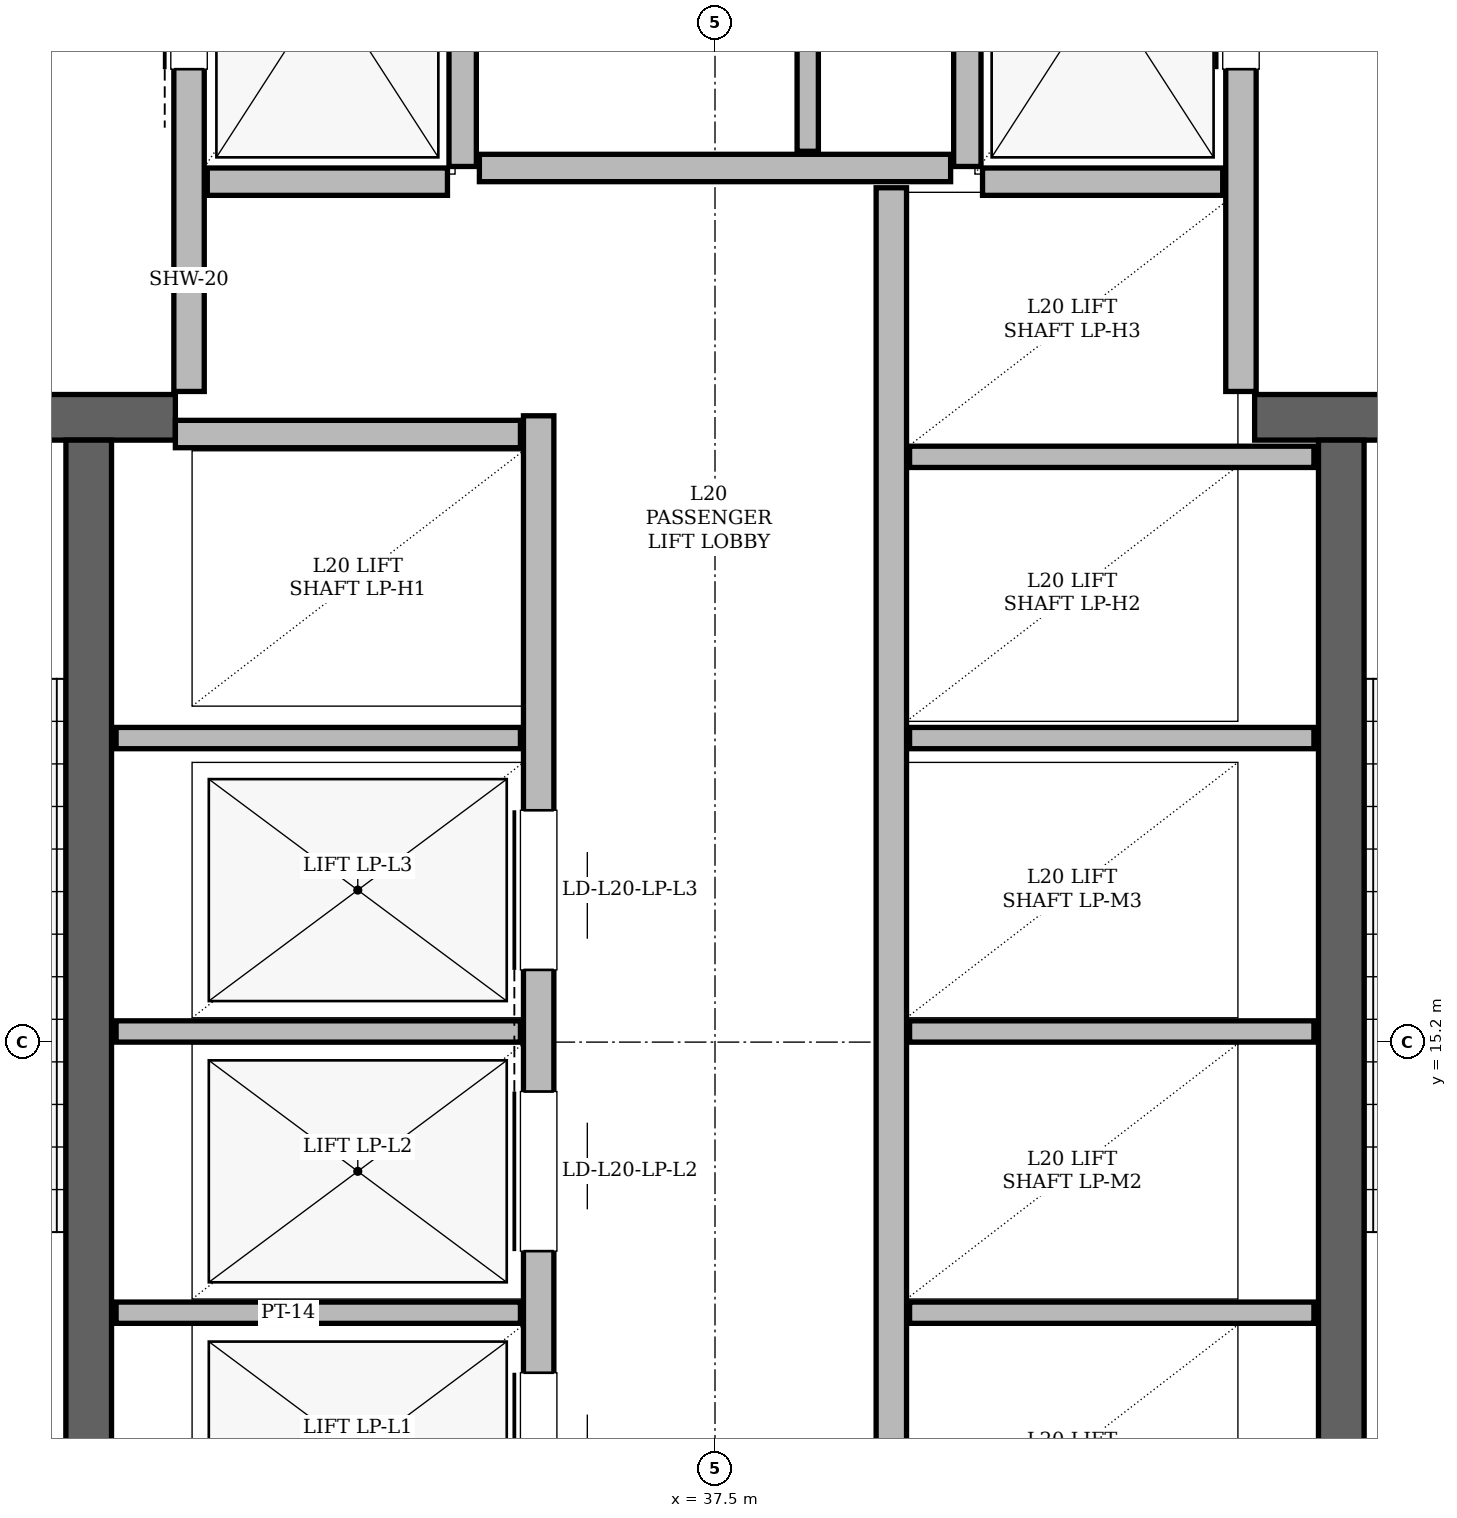
"""IFC4 building model, lengths in metres.
Left out: names, types, materials, properties, quantities, classifications, styles, units other than length and angle.
Written with IfcOpenShell. Run it as: python <this file> out.ifc"""

import sys

from ifc_helpers import new_model, si_unit, direction, frame, frame_2d, origin, place, context, subcontext, project, spatial, rectangle, extrude, element, fill, save


model = new_model("IFC4")
c1 = context("Model", 3, precision=1e-05, world=origin(), true_north=direction((0.0, 1.0)))
c2 = subcontext(c1, "Body", "Model", "MODEL_VIEW")
j1 = project(units=[si_unit("LENGTHUNIT", "METRE"), si_unit("PLANEANGLEUNIT", "RADIAN")], contexts=[c1])
p1 = place(None, origin())
s1 = spatial("IfcSite", under=j1, at=p1, CompositionType="ELEMENT")
p2 = place(p1, origin())
s2 = spatial("IfcBuilding", under=s1, at=p2, CompositionType="ELEMENT")
p3 = place(p2, frame((0.0, 0.0, 77.7)))
s3 = spatial("IfcBuildingStorey", under=s2, at=p3, CompositionType="ELEMENT", Elevation=77.7)
p4 = place(p3, frame((29.94, 19.31, 0.0), z_axis=(0.0, 0.0, 1.0), x_axis=(1.0, 0.0, 0.0)))
e1 = element("IfcWall", 1, at=p4, inside=s3, PredefinedType="SHEAR", context=c2, shape_type="SweptSolid", body=[
    extrude(rectangle(XDim=4.01, YDim=0.3, at=frame_2d((2.005, 0.0))), origin(), (0.0, 0.0, 1.0), 4.56),
])
p5 = place(p4, frame((1.01, 0.0, 0.0)))
e2 = element("IfcOpeningElement", 2, at=p5, cuts=e1, PredefinedType="OPENING", context=c2, shape_type="SweptSolid", body=[
    extrude(rectangle(XDim=1.4, YDim=2.2, at=frame_2d((0.7, 1.1))), frame((0.0, 0.15, 0.0), z_axis=(0.0, -1.0, 0.0), x_axis=(1.0, 0.0, 0.0)), (0.0, 0.0, 1.0), 0.3),
])
p6 = place(p3, frame((41.05, 19.31, 0.0), z_axis=(0.0, 0.0, 1.0), x_axis=(1.0, 0.0, 0.0)))
e3 = element("IfcWall", 3, at=p6, inside=s3, PredefinedType="SHEAR", context=c2, shape_type="SweptSolid", body=[
    extrude(rectangle(XDim=4.01, YDim=0.3, at=frame_2d((2.005, 0.0))), origin(), (0.0, 0.0, 1.0), 4.56),
])
p7 = place(p6, frame((1.6, 0.0, 0.0)))
e4 = element("IfcOpeningElement", 4, at=p7, cuts=e3, PredefinedType="OPENING", context=c2, shape_type="SweptSolid", body=[
    extrude(rectangle(XDim=1.4, YDim=2.2, at=frame_2d((0.7, 1.1))), frame((0.0, 0.15, 0.0), z_axis=(0.0, -1.0, 0.0), x_axis=(1.0, 0.0, 0.0)), (0.0, 0.0, 1.0), 0.3),
])
for number, where, z_axis, x_axis in (
    (5, (33.38, 11.54, 0.0), (0.0, 0.0, 1.0), (0.0, 1.0, 0.0)),
    (6, (41.62, 11.54, 0.0), (0.0, 0.0, 1.0), (0.0, 1.0, 0.0)),
):
    element("IfcWall", number, at=place(p3, frame(where, z_axis=z_axis, x_axis=x_axis)), inside=s3, PredefinedType="SHEAR", context=c2, shape_type="SweptSolid", body=[
        extrude(rectangle(XDim=7.62, YDim=0.3, at=frame_2d((3.81, 0.0))), origin(), (0.0, 0.0, 1.0), 4.56),
    ])
p8 = place(p3, frame((34.04, 19.48, 0.0), z_axis=(0.0, 0.0, 1.0), x_axis=(0.0, 1.0, 0.0)))
e7 = element("IfcWall", 7, at=p8, inside=s3, PredefinedType="PARTITIONING", context=c2, shape_type="SweptSolid", body=[
    extrude(rectangle(XDim=4.5, YDim=0.2, at=frame_2d((2.25, 0.0))), origin(), (0.0, 0.0, 1.0), 3.6),
])
p9 = place(p8, frame((2.12, 0.0, 0.0)))
e8 = element("IfcOpeningElement", 8, at=p9, cuts=e7, PredefinedType="OPENING", context=c2, shape_type="SweptSolid", body=[
    extrude(rectangle(XDim=1.1, YDim=2.2, at=frame_2d((0.55, 1.1))), frame((0.0, 0.1, 0.0), z_axis=(0.0, -1.0, 0.0), x_axis=(1.0, 0.0, 0.0)), (0.0, 0.0, 1.0), 0.2),
])
p10 = place(p3, frame((35.84, 20.96, 0.0), z_axis=(0.0, 0.0, 1.0), x_axis=(0.0, 1.0, 0.0)))
e9 = element("IfcWall", 9, at=p10, inside=s3, PredefinedType="PARTITIONING", context=c2, shape_type="SweptSolid", body=[
    extrude(rectangle(XDim=3.02, YDim=0.18, at=frame_2d((1.51, 0.0))), origin(), (0.0, 0.0, 1.0), 3.6),
])
p11 = place(p3, frame((34.16, 20.86, 0.0), z_axis=(0.0, 0.0, 1.0), x_axis=(1.0, 0.0, 0.0)))
e10 = element("IfcWall", 10, at=p11, inside=s3, PredefinedType="PARTITIONING", context=c2, shape_type="SweptSolid", body=[
    extrude(rectangle(XDim=1.58, YDim=0.18, at=frame_2d((0.79, 0.0))), origin(), (0.0, 0.0, 1.0), 4.56),
])
p12 = place(p3, frame((40.96, 19.48, 0.0), z_axis=(0.0, 0.0, 1.0), x_axis=(0.0, 1.0, 0.0)))
e11 = element("IfcWall", 11, at=p12, inside=s3, PredefinedType="PARTITIONING", context=c2, shape_type="SweptSolid", body=[
    extrude(rectangle(XDim=4.5, YDim=0.2, at=frame_2d((2.25, 0.0))), origin(), (0.0, 0.0, 1.0), 3.6),
])
p13 = place(p12, frame((2.12, 0.0, 0.0)))
e12 = element("IfcOpeningElement", 12, at=p13, cuts=e11, PredefinedType="OPENING", context=c2, shape_type="SweptSolid", body=[
    extrude(rectangle(XDim=1.1, YDim=2.2, at=frame_2d((0.55, 1.1))), frame((0.0, 0.1, 0.0), z_axis=(0.0, -1.0, 0.0), x_axis=(1.0, 0.0, 0.0)), (0.0, 0.0, 1.0), 0.2),
])
p14 = place(p3, frame((39.16, 20.96, 0.0), z_axis=(0.0, 0.0, 1.0), x_axis=(0.0, 1.0, 0.0)))
e13 = element("IfcWall", 13, at=p14, inside=s3, PredefinedType="PARTITIONING", context=c2, shape_type="SweptSolid", body=[
    extrude(rectangle(XDim=3.02, YDim=0.18, at=frame_2d((1.51, 0.0))), origin(), (0.0, 0.0, 1.0), 3.6),
])
p15 = place(p3, frame((39.26, 20.86, 0.0), z_axis=(0.0, 0.0, 1.0), x_axis=(1.0, 0.0, 0.0)))
e14 = element("IfcWall", 14, at=p15, inside=s3, PredefinedType="PARTITIONING", context=c2, shape_type="SweptSolid", body=[
    extrude(rectangle(XDim=1.58, YDim=0.18, at=frame_2d((0.79, 0.0))), origin(), (0.0, 0.0, 1.0), 4.56),
])
p16 = place(p3, frame((36.34, 11.72, 0.0), z_axis=(0.0, 0.0, 1.0), x_axis=(0.0, 1.0, 0.0)))
e15 = element("IfcWall", 15, at=p16, inside=s3, PredefinedType="PARTITIONING", context=c2, shape_type="SweptSolid", body=[
    extrude(rectangle(XDim=7.6, YDim=0.2, at=frame_2d((3.8, 0.0))), origin(), (0.0, 0.0, 1.0), 4.56),
])
p17 = place(p16, frame((0.255, 0.0, 0.0)))
e16 = element("IfcOpeningElement", 16, at=p17, cuts=e15, PredefinedType="OPENING", context=c2, shape_type="SweptSolid", body=[
    extrude(rectangle(XDim=1.05, YDim=2.15, at=frame_2d((0.525, 1.075))), frame((0.0, 0.1, 0.0), z_axis=(0.0, -1.0, 0.0), x_axis=(1.0, 0.0, 0.0)), (0.0, 0.0, 1.0), 0.2),
])
p18 = place(p16, frame((2.105, 0.0, 0.0)))
e17 = element("IfcOpeningElement", 17, at=p18, cuts=e15, PredefinedType="OPENING", context=c2, shape_type="SweptSolid", body=[
    extrude(rectangle(XDim=1.05, YDim=2.15, at=frame_2d((0.525, 1.075))), frame((0.0, 0.1, 0.0), z_axis=(0.0, -1.0, 0.0), x_axis=(1.0, 0.0, 0.0)), (0.0, 0.0, 1.0), 0.2),
])
p19 = place(p16, frame((3.955, 0.0, 0.0)))
e18 = element("IfcOpeningElement", 18, at=p19, cuts=e15, PredefinedType="OPENING", context=c2, shape_type="SweptSolid", body=[
    extrude(rectangle(XDim=1.05, YDim=2.15, at=frame_2d((0.525, 1.075))), frame((0.0, 0.1, 0.0), z_axis=(0.0, -1.0, 0.0), x_axis=(1.0, 0.0, 0.0)), (0.0, 0.0, 1.0), 0.2),
])
p20 = place(p3, frame((33.95, 19.2, 0.0), z_axis=(0.0, 0.0, 1.0), x_axis=(1.0, 0.0, 0.0)))
e19 = element("IfcWall", 19, at=p20, inside=s3, PredefinedType="PARTITIONING", context=c2, shape_type="SweptSolid", body=[
    extrude(rectangle(XDim=2.27, YDim=0.18, at=frame_2d((1.135, 0.0))), origin(), (0.0, 0.0, 1.0), 4.56),
])
for number, where, z_axis, x_axis in (
    (20, (33.56, 13.42, 0.0), (0.0, 0.0, 1.0), (1.0, 0.0, 0.0)),
    (21, (33.56, 15.27, 0.0), (0.0, 0.0, 1.0), (1.0, 0.0, 0.0)),
    (22, (33.56, 17.2, 0.0), (0.0, 0.0, 1.0), (1.0, 0.0, 0.0)),
):
    element("IfcWall", number, at=place(p3, frame(where, z_axis=z_axis, x_axis=x_axis)), inside=s3, PredefinedType="PARTITIONING", context=c2, shape_type="SweptSolid", body=[
        extrude(rectangle(XDim=2.66, YDim=0.14, at=frame_2d((1.33, 0.0))), origin(), (0.0, 0.0, 1.0), 4.56),
    ])
p21 = place(p3, frame((38.66, 11.72, 0.0), z_axis=(0.0, 0.0, 1.0), x_axis=(0.0, 1.0, 0.0)))
e23 = element("IfcWall", 23, at=p21, inside=s3, PredefinedType="PARTITIONING", context=c2, shape_type="SweptSolid", body=[
    extrude(rectangle(XDim=9.1, YDim=0.2, at=frame_2d((4.55, 0.0))), origin(), (0.0, 0.0, 1.0), 4.56),
])
for number, where, z_axis, x_axis in (
    (24, (38.78, 13.42, 0.0), (0.0, 0.0, 1.0), (1.0, 0.0, 0.0)),
    (25, (38.78, 15.27, 0.0), (0.0, 0.0, 1.0), (1.0, 0.0, 0.0)),
    (26, (38.78, 17.2, 0.0), (0.0, 0.0, 1.0), (1.0, 0.0, 0.0)),
    (27, (38.78, 19.05, 0.0), (0.0, 0.0, 1.0), (1.0, 0.0, 0.0)),
):
    element("IfcWall", number, at=place(p3, frame(where, z_axis=z_axis, x_axis=x_axis)), inside=s3, PredefinedType="PARTITIONING", context=c2, shape_type="SweptSolid", body=[
        extrude(rectangle(XDim=2.66, YDim=0.14, at=frame_2d((1.33, 0.0))), origin(), (0.0, 0.0, 1.0), 4.56),
    ])
p22 = place(p3, frame((35.95, 20.95, 0.0), z_axis=(0.0, 0.0, 1.0), x_axis=(1.0, 0.0, 0.0)))
e28 = element("IfcWall", 28, at=p22, inside=s3, PredefinedType="PARTITIONING", context=c2, shape_type="SweptSolid", body=[
    extrude(rectangle(XDim=3.1, YDim=0.18, at=frame_2d((1.55, 0.0))), origin(), (0.0, 0.0, 1.0), 4.56),
])
p23 = place(p3, frame((38.11, 21.06, 0.0), z_axis=(0.0, 0.0, 1.0), x_axis=(0.0, 1.0, 0.0)))
e29 = element("IfcWall", 29, at=p23, inside=s3, PredefinedType="PARTITIONING", context=c2, shape_type="SweptSolid", body=[
    extrude(rectangle(XDim=2.92, YDim=0.14, at=frame_2d((1.46, 0.0))), origin(), (0.0, 0.0, 1.0), 3.6),
])
p24 = place(p9, origin())
e30 = element("IfcDoor", 30, at=p24, inside=s3, OperationType="SLIDING_TO_LEFT", PredefinedType="DOOR", context=c2, shape_type="SweptSolid", body=[
    extrude(rectangle(XDim=1.1, YDim=2.2, at=frame_2d((0.55, 1.1))), frame((0.0, 0.025, 0.0), z_axis=(0.0, -1.0, 0.0), x_axis=(1.0, 0.0, 0.0)), (0.0, 0.0, 1.0), 0.05),
])
fill(e8, e30)
p25 = place(p13, origin())
e31 = element("IfcDoor", 31, at=p25, inside=s3, OperationType="SLIDING_TO_RIGHT", PredefinedType="DOOR", context=c2, shape_type="SweptSolid", body=[
    extrude(rectangle(XDim=1.1, YDim=2.2, at=frame_2d((0.55, 1.1))), frame((0.0, 0.025, 0.0), z_axis=(0.0, -1.0, 0.0), x_axis=(1.0, 0.0, 0.0)), (0.0, 0.0, 1.0), 0.05),
])
fill(e12, e31)
p26 = place(p17, origin())
e32 = element("IfcDoor", 32, at=p26, inside=s3, OperationType="SLIDING_TO_LEFT", PredefinedType="DOOR", context=c2, shape_type="SweptSolid", body=[
    extrude(rectangle(XDim=1.05, YDim=2.15, at=frame_2d((0.525, 1.075))), frame((0.0, 0.025, 0.0), z_axis=(0.0, -1.0, 0.0), x_axis=(1.0, 0.0, 0.0)), (0.0, 0.0, 1.0), 0.05),
])
fill(e16, e32)
p27 = place(p18, origin())
e33 = element("IfcDoor", 33, at=p27, inside=s3, OperationType="SLIDING_TO_RIGHT", PredefinedType="DOOR", context=c2, shape_type="SweptSolid", body=[
    extrude(rectangle(XDim=1.05, YDim=2.15, at=frame_2d((0.525, 1.075))), frame((0.0, 0.025, 0.0), z_axis=(0.0, -1.0, 0.0), x_axis=(1.0, 0.0, 0.0)), (0.0, 0.0, 1.0), 0.05),
])
fill(e17, e33)
p28 = place(p19, origin())
e34 = element("IfcDoor", 34, at=p28, inside=s3, OperationType="SLIDING_TO_LEFT", PredefinedType="DOOR", context=c2, shape_type="SweptSolid", body=[
    extrude(rectangle(XDim=1.05, YDim=2.15, at=frame_2d((0.525, 1.075))), frame((0.0, 0.025, 0.0), z_axis=(0.0, -1.0, 0.0), x_axis=(1.0, 0.0, 0.0)), (0.0, 0.0, 1.0), 0.05),
])
fill(e18, e34)
save(model, sys.argv[1])
